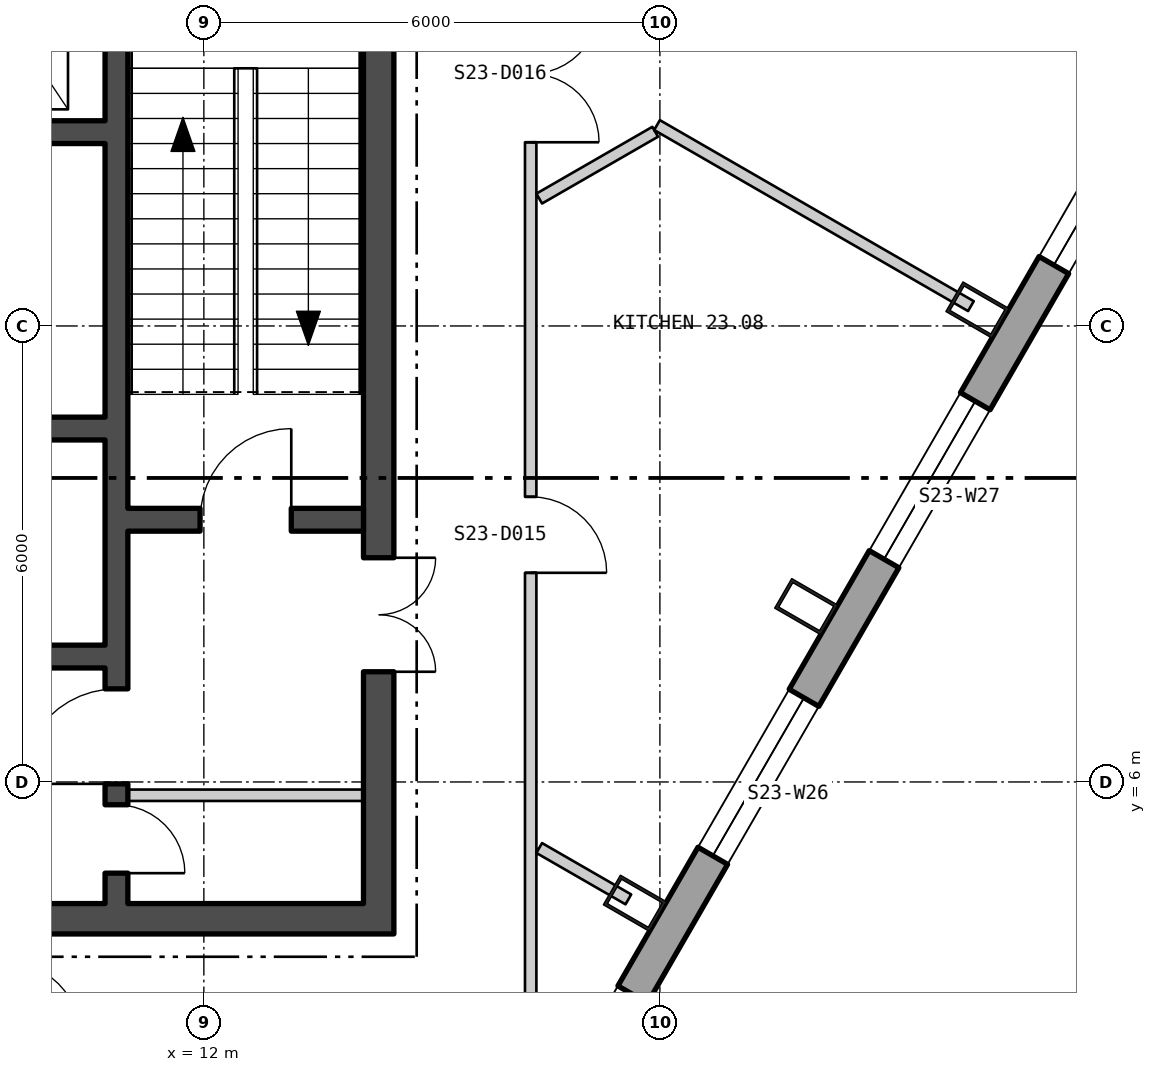
"""IFC4 building model, lengths in metres.
Left out: names, types, materials, properties, quantities, classifications, styles, units other than length and angle.
Written with IfcOpenShell. Run it as: python <this file> out.ifc"""

import sys

from ifc_helpers import new_model, si_unit, direction, frame, frame_2d, origin, origin_2d, place, context, subcontext, project, spatial, polyline, rectangle, hollow_rectangle, outline, extrude, element, fill, save


model = new_model("IFC4")
c1 = context("Model", 3, precision=1e-05, world=origin(), true_north=direction((0.0, 1.0)))
c2 = subcontext(c1, "Body", "Model", "MODEL_VIEW")
j1 = project(units=[si_unit("LENGTHUNIT", "METRE"), si_unit("PLANEANGLEUNIT", "RADIAN")], contexts=[c1])
p1 = place(None, origin())
s1 = spatial("IfcSite", under=j1, at=p1, CompositionType="ELEMENT")
p2 = place(p1, origin())
s2 = spatial("IfcBuilding", under=s1, at=p2, CompositionType="ELEMENT")
p3 = place(p2, frame((0.0, 0.0, 304.2)))
s3 = spatial("IfcBuildingStorey", under=s2, at=p3, CompositionType="ELEMENT", Elevation=304.2)
for number, where, z_axis, x_axis in (
    (1, (17.671, 4.404, 0.0), (0.0, 0.0, 1.0), (0.5, 0.866, 0.0)),
    (2, (19.925, 8.307, 0.0), (0.0, 0.0, 1.0), (0.5, 0.866, 0.0)),
    (3, (22.178, 12.21, 0.0), (0.0, 0.0, 1.0), (0.5, 0.866, 0.0)),
):
    element("IfcColumn", number, at=place(p3, frame(where, z_axis=z_axis, x_axis=x_axis)), inside=s3, PredefinedType="COLUMN", context=c2, shape_type="SweptSolid", body=[
        extrude(hollow_rectangle(XDim=0.45, YDim=0.7, WallThickness=0.04, at=origin_2d()), origin(), (0.0, 0.0, 1.0), 4.2),
    ])
p4 = place(p3, frame((2.23, -23.491, -0.18), z_axis=(0.0, 0.0, 1.0), x_axis=(0.500000141277, 0.866025322218, 0.0)))
e4 = element("IfcWall", 4, at=p4, inside=s3, PredefinedType="SOLIDWALL", context=c2, shape_type="SweptSolid", body=[
    extrude(outline(polyline([(-0.13, -0.225), (45.86, -0.225), (45.6, 0.225), (0.13, 0.225), (-0.13, -0.225)])), origin(), (0.0, 0.0, 1.0), 3.98),
])
p5 = place(p4, frame((1.424, 0.0, 1.08)))
e5 = element("IfcOpeningElement", 5, at=p5, cuts=e4, PredefinedType="OPENING", context=c2, shape_type="SweptSolid", body=[
    extrude(rectangle(XDim=2.4, YDim=2.3, at=frame_2d((1.2, 1.15))), frame((0.0, 0.235, 0.0), z_axis=(0.0, -1.0, 0.0), x_axis=(1.0, 0.0, 0.0)), (0.0, 0.0, 1.0), 0.47),
])
p6 = place(p4, frame((5.892, 0.0, 1.08)))
e6 = element("IfcOpeningElement", 6, at=p6, cuts=e4, PredefinedType="OPENING", context=c2, shape_type="SweptSolid", body=[
    extrude(rectangle(XDim=2.4, YDim=2.3, at=frame_2d((1.2, 1.15))), frame((0.0, 0.235, 0.0), z_axis=(0.0, -1.0, 0.0), x_axis=(1.0, 0.0, 0.0)), (0.0, 0.0, 1.0), 0.47),
])
p7 = place(p4, frame((10.399, 0.0, 1.08)))
e7 = element("IfcOpeningElement", 7, at=p7, cuts=e4, PredefinedType="OPENING", context=c2, shape_type="SweptSolid", body=[
    extrude(rectangle(XDim=2.4, YDim=2.3, at=frame_2d((1.2, 1.15))), frame((0.0, 0.235, 0.0), z_axis=(0.0, -1.0, 0.0), x_axis=(1.0, 0.0, 0.0)), (0.0, 0.0, 1.0), 0.47),
])
p8 = place(p4, frame((14.905, 0.0, 1.08)))
e8 = element("IfcOpeningElement", 8, at=p8, cuts=e4, PredefinedType="OPENING", context=c2, shape_type="SweptSolid", body=[
    extrude(rectangle(XDim=2.4, YDim=2.3, at=frame_2d((1.2, 1.15))), frame((0.0, 0.235, 0.0), z_axis=(0.0, -1.0, 0.0), x_axis=(1.0, 0.0, 0.0)), (0.0, 0.0, 1.0), 0.47),
])
p9 = place(p4, frame((19.412, 0.0, 1.08)))
e9 = element("IfcOpeningElement", 9, at=p9, cuts=e4, PredefinedType="OPENING", context=c2, shape_type="SweptSolid", body=[
    extrude(rectangle(XDim=2.4, YDim=2.3, at=frame_2d((1.2, 1.15))), frame((0.0, 0.235, 0.0), z_axis=(0.0, -1.0, 0.0), x_axis=(1.0, 0.0, 0.0)), (0.0, 0.0, 1.0), 0.47),
])
p10 = place(p4, frame((23.918, 0.0, 1.08)))
e10 = element("IfcOpeningElement", 10, at=p10, cuts=e4, PredefinedType="OPENING", context=c2, shape_type="SweptSolid", body=[
    extrude(rectangle(XDim=2.4, YDim=2.3, at=frame_2d((1.2, 1.15))), frame((0.0, 0.235, 0.0), z_axis=(0.0, -1.0, 0.0), x_axis=(1.0, 0.0, 0.0)), (0.0, 0.0, 1.0), 0.47),
])
p11 = place(p4, frame((28.425, 0.0, 1.08)))
e11 = element("IfcOpeningElement", 11, at=p11, cuts=e4, PredefinedType="OPENING", context=c2, shape_type="SweptSolid", body=[
    extrude(rectangle(XDim=2.4, YDim=2.3, at=frame_2d((1.2, 1.15))), frame((0.0, 0.235, 0.0), z_axis=(0.0, -1.0, 0.0), x_axis=(1.0, 0.0, 0.0)), (0.0, 0.0, 1.0), 0.47),
])
p12 = place(p4, frame((32.932, 0.0, 1.08)))
e12 = element("IfcOpeningElement", 12, at=p12, cuts=e4, PredefinedType="OPENING", context=c2, shape_type="SweptSolid", body=[
    extrude(rectangle(XDim=2.4, YDim=2.3, at=frame_2d((1.2, 1.15))), frame((0.0, 0.235, 0.0), z_axis=(0.0, -1.0, 0.0), x_axis=(1.0, 0.0, 0.0)), (0.0, 0.0, 1.0), 0.47),
])
p13 = place(p4, frame((37.438, 0.0, 1.08)))
e13 = element("IfcOpeningElement", 13, at=p13, cuts=e4, PredefinedType="OPENING", context=c2, shape_type="SweptSolid", body=[
    extrude(rectangle(XDim=2.4, YDim=2.3, at=frame_2d((1.2, 1.15))), frame((0.0, 0.235, 0.0), z_axis=(0.0, -1.0, 0.0), x_axis=(1.0, 0.0, 0.0)), (0.0, 0.0, 1.0), 0.47),
])
p14 = place(p4, frame((41.907, 0.0, 1.08)))
e14 = element("IfcOpeningElement", 14, at=p14, cuts=e4, PredefinedType="OPENING", context=c2, shape_type="SweptSolid", body=[
    extrude(rectangle(XDim=2.4, YDim=2.3, at=frame_2d((1.2, 1.15))), frame((0.0, 0.235, 0.0), z_axis=(0.0, -1.0, 0.0), x_axis=(1.0, 0.0, 0.0)), (0.0, 0.0, 1.0), 0.47),
])
p15 = place(p3, frame((-14.5, 4.2, 0.0), z_axis=(0.0, 0.0, 1.0), x_axis=(1.0, 0.0, 0.0)))
e15 = element("IfcWall", 15, at=p15, inside=s3, PredefinedType="SHEAR", context=c2, shape_type="SweptSolid", body=[
    extrude(rectangle(XDim=29.0, YDim=0.4, at=frame_2d((14.5, 0.0))), origin(), (0.0, 0.0, 1.0), 4.0),
])
p16 = place(p15, frame((9.0, 0.0, 0.0)))
e16 = element("IfcOpeningElement", 16, at=p16, cuts=e15, PredefinedType="OPENING", context=c2, shape_type="SweptSolid", body=[
    extrude(rectangle(XDim=1.8, YDim=2.4, at=frame_2d((0.9, 1.2))), frame((0.0, 0.21, 0.0), z_axis=(0.0, -1.0, 0.0), x_axis=(1.0, 0.0, 0.0)), (0.0, 0.0, 1.0), 0.42),
])
p17 = place(p15, frame((19.0, 0.0, 0.0)))
e17 = element("IfcOpeningElement", 17, at=p17, cuts=e15, PredefinedType="OPENING", context=c2, shape_type="SweptSolid", body=[
    extrude(rectangle(XDim=1.8, YDim=2.4, at=frame_2d((0.9, 1.2))), frame((0.0, 0.21, 0.0), z_axis=(0.0, -1.0, 0.0), x_axis=(1.0, 0.0, 0.0)), (0.0, 0.0, 1.0), 0.42),
])
p18 = place(p3, frame((14.3, 4.4, 0.0), z_axis=(0.0, 0.0, 1.0), x_axis=(0.0, 1.0, 0.0)))
e18 = element("IfcWall", 18, at=p18, inside=s3, PredefinedType="SHEAR", context=c2, shape_type="SweptSolid", body=[
    extrude(rectangle(XDim=13.2, YDim=0.4, at=frame_2d((6.6, 0.0))), origin(), (0.0, 0.0, 1.0), 4.0),
])
p19 = place(p18, frame((3.05, 0.0, 0.0)))
e19 = element("IfcOpeningElement", 19, at=p19, cuts=e18, PredefinedType="OPENING", context=c2, shape_type="SweptSolid", body=[
    extrude(rectangle(XDim=1.5, YDim=2.1, at=frame_2d((0.75, 1.05))), frame((0.0, 0.21, 0.0), z_axis=(0.0, -1.0, 0.0), x_axis=(1.0, 0.0, 0.0)), (0.0, 0.0, 1.0), 0.42),
])
p20 = place(p3, frame((10.85, 4.4, 0.0), z_axis=(0.0, 0.0, 1.0), x_axis=(0.0, 1.0, 0.0)))
e20 = element("IfcWall", 20, at=p20, inside=s3, PredefinedType="SHEAR", context=c2, shape_type="SweptSolid", body=[
    extrude(rectangle(XDim=13.2, YDim=0.3, at=frame_2d((6.6, 0.0))), origin(), (0.0, 0.0, 1.0), 4.0),
])
p21 = place(p20, frame((1.575, 0.0, 0.0)))
e21 = element("IfcOpeningElement", 21, at=p21, cuts=e20, PredefinedType="OPENING", context=c2, shape_type="SweptSolid", body=[
    extrude(rectangle(XDim=1.25, YDim=2.1, at=frame_2d((0.625, 1.05))), frame((0.0, 0.16, 0.0), z_axis=(0.0, -1.0, 0.0), x_axis=(1.0, 0.0, 0.0)), (0.0, 0.0, 1.0), 0.32),
])
p22 = place(p20, frame((0.4, 0.0, 0.0)))
e22 = element("IfcOpeningElement", 22, at=p22, cuts=e20, PredefinedType="OPENING", context=c2, shape_type="SweptSolid", body=[
    extrude(rectangle(XDim=0.9, YDim=2.1, at=frame_2d((0.45, 1.05))), frame((0.0, 0.16, 0.0), z_axis=(0.0, -1.0, 0.0), x_axis=(1.0, 0.0, 0.0)), (0.0, 0.0, 1.0), 0.32),
])
p23 = place(p3, frame((11.0, 9.45, 0.0), z_axis=(0.0, 0.0, 1.0), x_axis=(1.0, 0.0, 0.0)))
e23 = element("IfcWall", 23, at=p23, inside=s3, PredefinedType="SHEAR", context=c2, shape_type="SweptSolid", body=[
    extrude(rectangle(XDim=3.1, YDim=0.3, at=frame_2d((1.55, 0.0))), origin(), (0.0, 0.0, 1.0), 4.0),
])
p24 = place(p23, frame((0.95, 0.0, 0.0)))
e24 = element("IfcOpeningElement", 24, at=p24, cuts=e23, PredefinedType="OPENING", context=c2, shape_type="SweptSolid", body=[
    extrude(rectangle(XDim=1.2, YDim=2.1, at=frame_2d((0.6, 1.05))), frame((0.0, 0.16, 0.0), z_axis=(0.0, -1.0, 0.0), x_axis=(1.0, 0.0, 0.0)), (0.0, 0.0, 1.0), 0.32),
])
p25 = place(p3, frame((-10.7, 14.55, 0.0), z_axis=(0.0, 0.0, 1.0), x_axis=(1.0, 0.0, 0.0)))
e25 = element("IfcWall", 25, at=p25, inside=s3, PredefinedType="SHEAR", context=c2, shape_type="SweptSolid", body=[
    extrude(rectangle(XDim=21.4, YDim=0.3, at=frame_2d((10.7, 0.0))), origin(), (0.0, 0.0, 1.0), 4.0),
])
p26 = place(p25, frame((0.738, 0.0, 0.0)))
e26 = element("IfcOpeningElement", 26, at=p26, cuts=e25, PredefinedType="OPENING", context=c2, shape_type="SweptSolid", body=[
    extrude(rectangle(XDim=1.1, YDim=2.1, at=frame_2d((0.55, 1.05))), frame((0.0, 0.16, 0.0), z_axis=(0.0, -1.0, 0.0), x_axis=(1.0, 0.0, 0.0)), (0.0, 0.0, 1.0), 0.32),
])
p27 = place(p25, frame((3.462, 0.0, 0.0)))
e27 = element("IfcOpeningElement", 27, at=p27, cuts=e25, PredefinedType="OPENING", context=c2, shape_type="SweptSolid", body=[
    extrude(rectangle(XDim=1.1, YDim=2.1, at=frame_2d((0.55, 1.05))), frame((0.0, 0.16, 0.0), z_axis=(0.0, -1.0, 0.0), x_axis=(1.0, 0.0, 0.0)), (0.0, 0.0, 1.0), 0.32),
])
p28 = place(p25, frame((6.138, 0.0, 0.0)))
e28 = element("IfcOpeningElement", 28, at=p28, cuts=e25, PredefinedType="OPENING", context=c2, shape_type="SweptSolid", body=[
    extrude(rectangle(XDim=1.1, YDim=2.1, at=frame_2d((0.55, 1.05))), frame((0.0, 0.16, 0.0), z_axis=(0.0, -1.0, 0.0), x_axis=(1.0, 0.0, 0.0)), (0.0, 0.0, 1.0), 0.32),
])
p29 = place(p25, frame((8.812, 0.0, 0.0)))
e29 = element("IfcOpeningElement", 29, at=p29, cuts=e25, PredefinedType="OPENING", context=c2, shape_type="SweptSolid", body=[
    extrude(rectangle(XDim=1.1, YDim=2.1, at=frame_2d((0.55, 1.05))), frame((0.0, 0.16, 0.0), z_axis=(0.0, -1.0, 0.0), x_axis=(1.0, 0.0, 0.0)), (0.0, 0.0, 1.0), 0.32),
])
p30 = place(p25, frame((19.562, 0.0, 0.0)))
e30 = element("IfcOpeningElement", 30, at=p30, cuts=e25, PredefinedType="OPENING", context=c2, shape_type="SweptSolid", body=[
    extrude(rectangle(XDim=1.1, YDim=2.1, at=frame_2d((0.55, 1.05))), frame((0.0, 0.16, 0.0), z_axis=(0.0, -1.0, 0.0), x_axis=(1.0, 0.0, 0.0)), (0.0, 0.0, 1.0), 0.32),
])
p31 = place(p25, frame((11.537, 0.0, 0.0)))
e31 = element("IfcOpeningElement", 31, at=p31, cuts=e25, PredefinedType="OPENING", context=c2, shape_type="SweptSolid", body=[
    extrude(rectangle(XDim=1.0, YDim=2.1, at=frame_2d((0.5, 1.05))), frame((0.0, 0.16, 0.0), z_axis=(0.0, -1.0, 0.0), x_axis=(1.0, 0.0, 0.0)), (0.0, 0.0, 1.0), 0.32),
])
p32 = place(p25, frame((14.213, 0.0, 0.0)))
e32 = element("IfcOpeningElement", 32, at=p32, cuts=e25, PredefinedType="OPENING", context=c2, shape_type="SweptSolid", body=[
    extrude(rectangle(XDim=1.0, YDim=2.1, at=frame_2d((0.5, 1.05))), frame((0.0, 0.16, 0.0), z_axis=(0.0, -1.0, 0.0), x_axis=(1.0, 0.0, 0.0)), (0.0, 0.0, 1.0), 0.32),
])
p33 = place(p25, frame((16.887, 0.0, 0.0)))
e33 = element("IfcOpeningElement", 33, at=p33, cuts=e25, PredefinedType="OPENING", context=c2, shape_type="SweptSolid", body=[
    extrude(rectangle(XDim=1.0, YDim=2.1, at=frame_2d((0.5, 1.05))), frame((0.0, 0.16, 0.0), z_axis=(0.0, -1.0, 0.0), x_axis=(1.0, 0.0, 0.0)), (0.0, 0.0, 1.0), 0.32),
])
p34 = place(p3, frame((2.6, 10.65, 0.0), z_axis=(0.0, 0.0, 1.0), x_axis=(1.0, 0.0, 0.0)))
e34 = element("IfcWall", 34, at=p34, inside=s3, PredefinedType="SHEAR", context=c2, shape_type="SweptSolid", body=[
    extrude(rectangle(XDim=8.1, YDim=0.3, at=frame_2d((4.05, 0.0))), origin(), (0.0, 0.0, 1.0), 4.0),
])
p35 = place(p34, frame((0.933, 0.0, 0.0)))
e35 = element("IfcOpeningElement", 35, at=p35, cuts=e34, PredefinedType="OPENING", context=c2, shape_type="SweptSolid", body=[
    extrude(rectangle(XDim=1.0, YDim=2.1, at=frame_2d((0.5, 1.05))), frame((0.0, 0.16, 0.0), z_axis=(0.0, -1.0, 0.0), x_axis=(1.0, 0.0, 0.0)), (0.0, 0.0, 1.0), 0.32),
])
p36 = place(p34, frame((3.6, 0.0, 0.0)))
e36 = element("IfcOpeningElement", 36, at=p36, cuts=e34, PredefinedType="OPENING", context=c2, shape_type="SweptSolid", body=[
    extrude(rectangle(XDim=1.0, YDim=2.1, at=frame_2d((0.5, 1.05))), frame((0.0, 0.16, 0.0), z_axis=(0.0, -1.0, 0.0), x_axis=(1.0, 0.0, 0.0)), (0.0, 0.0, 1.0), 0.32),
])
p37 = place(p34, frame((6.317, 0.0, 0.0)))
e37 = element("IfcOpeningElement", 37, at=p37, cuts=e34, PredefinedType="OPENING", context=c2, shape_type="SweptSolid", body=[
    extrude(rectangle(XDim=1.0, YDim=2.1, at=frame_2d((0.5, 1.05))), frame((0.0, 0.16, 0.0), z_axis=(0.0, -1.0, 0.0), x_axis=(1.0, 0.0, 0.0)), (0.0, 0.0, 1.0), 0.32),
])
p38 = place(p3, frame((2.6, 7.65, 0.0), z_axis=(0.0, 0.0, 1.0), x_axis=(1.0, 0.0, 0.0)))
e38 = element("IfcWall", 38, at=p38, inside=s3, PredefinedType="SHEAR", context=c2, shape_type="SweptSolid", body=[
    extrude(rectangle(XDim=8.1, YDim=0.3, at=frame_2d((4.05, 0.0))), origin(), (0.0, 0.0, 1.0), 4.0),
])
p39 = place(p3, frame((11.0, 5.825, 0.0), z_axis=(0.0, 0.0, 1.0), x_axis=(1.0, 0.0, 0.0)))
e39 = element("IfcWall", 39, at=p39, inside=s3, PredefinedType="PARTITIONING", context=c2, shape_type="SweptSolid", body=[
    extrude(rectangle(XDim=3.1, YDim=0.15, at=frame_2d((1.55, 0.0))), origin(), (0.0, 0.0, 1.0), 4.0),
])
p40 = place(p3, frame((16.3, 2.125, 0.0), z_axis=(0.0, 0.0, 1.0), x_axis=(0.0, 1.0, 0.0)))
e40 = element("IfcWall", 40, at=p40, inside=s3, PredefinedType="PARTITIONING", context=c2, shape_type="SweptSolid", body=[
    extrude(rectangle(XDim=17.623, YDim=0.15, at=frame_2d((8.812, 0.0))), origin(), (0.0, 0.0, 1.0), 4.0),
])
p41 = place(p40, frame((6.627, 0.0, 0.0)))
e41 = element("IfcOpeningElement", 41, at=p41, cuts=e40, PredefinedType="OPENING", context=c2, shape_type="SweptSolid", body=[
    extrude(rectangle(XDim=1.0, YDim=2.1, at=frame_2d((0.5, 1.05))), frame((0.0, 0.085, 0.0), z_axis=(0.0, -1.0, 0.0), x_axis=(1.0, 0.0, 0.0)), (0.0, 0.0, 1.0), 0.17),
])
p42 = place(p40, frame((12.292, 0.0, 0.0)))
e42 = element("IfcOpeningElement", 42, at=p42, cuts=e40, PredefinedType="OPENING", context=c2, shape_type="SweptSolid", body=[
    extrude(rectangle(XDim=1.8, YDim=2.1, at=frame_2d((0.9, 1.05))), frame((0.0, 0.085, 0.0), z_axis=(0.0, -1.0, 0.0), x_axis=(1.0, 0.0, 0.0)), (0.0, 0.0, 1.0), 0.17),
])
p43 = place(p3, frame((16.412, 13.676, 0.0), z_axis=(0.0, 0.0, 1.0), x_axis=(0.866525711774, 0.499132438171, 0.0)))
e43 = element("IfcWall", 43, at=p43, inside=s3, PredefinedType="PARTITIONING", context=c2, shape_type="SweptSolid", body=[
    extrude(rectangle(XDim=1.761, YDim=0.15, at=frame_2d((0.881, 0.0))), origin(), (0.0, 0.0, 1.0), 4.0),
])
p44 = place(p3, frame((16.412, 5.131, 0.0), z_axis=(0.0, 0.0, 1.0), x_axis=(0.866419132933, -0.499317420173, 0.0)))
e44 = element("IfcWall", 44, at=p44, inside=s3, PredefinedType="PARTITIONING", context=c2, shape_type="SweptSolid", body=[
    extrude(rectangle(XDim=1.354, YDim=0.15, at=frame_2d((0.677, 0.0))), origin(), (0.0, 0.0, 1.0), 4.0),
])
p45 = place(p3, frame((17.962, 14.643, 0.0), z_axis=(0.0, 0.0, 1.0), x_axis=(0.866248432975, -0.499613502989, 0.0)))
e45 = element("IfcWall", 45, at=p45, inside=s3, PredefinedType="PARTITIONING", context=c2, shape_type="SweptSolid", body=[
    extrude(rectangle(XDim=4.768, YDim=0.15, at=frame_2d((2.384, 0.0))), origin(), (0.0, 0.0, 1.0), 4.0),
])
p46 = place(p11, origin())
e46 = element("IfcWindow", 46, at=p46, inside=s3, PartitioningType="SINGLE_PANEL", PredefinedType="WINDOW", context=c2, shape_type="SweptSolid", body=[
    extrude(rectangle(XDim=2.4, YDim=2.3, at=frame_2d((1.2, 1.15))), frame((0.0, 0.105, 0.0), z_axis=(0.0, -1.0, 0.0), x_axis=(1.0, 0.0, 0.0)), (0.0, 0.0, 1.0), 0.06),
])
fill(e11, e46)
p47 = place(p12, origin())
e47 = element("IfcWindow", 47, at=p47, inside=s3, PartitioningType="SINGLE_PANEL", PredefinedType="WINDOW", context=c2, shape_type="SweptSolid", body=[
    extrude(rectangle(XDim=2.4, YDim=2.3, at=frame_2d((1.2, 1.15))), frame((0.0, 0.105, 0.0), z_axis=(0.0, -1.0, 0.0), x_axis=(1.0, 0.0, 0.0)), (0.0, 0.0, 1.0), 0.06),
])
fill(e12, e47)
p48 = place(p13, origin())
e48 = element("IfcWindow", 48, at=p48, inside=s3, PartitioningType="SINGLE_PANEL", PredefinedType="WINDOW", context=c2, shape_type="SweptSolid", body=[
    extrude(rectangle(XDim=2.4, YDim=2.3, at=frame_2d((1.2, 1.15))), frame((0.0, 0.105, 0.0), z_axis=(0.0, -1.0, 0.0), x_axis=(1.0, 0.0, 0.0)), (0.0, 0.0, 1.0), 0.06),
])
fill(e13, e48)
p49 = place(p14, origin())
e49 = element("IfcWindow", 49, at=p49, inside=s3, PartitioningType="SINGLE_PANEL", PredefinedType="WINDOW", context=c2, shape_type="SweptSolid", body=[
    extrude(rectangle(XDim=2.4, YDim=2.3, at=frame_2d((1.2, 1.15))), frame((0.0, 0.105, 0.0), z_axis=(0.0, -1.0, 0.0), x_axis=(1.0, 0.0, 0.0)), (0.0, 0.0, 1.0), 0.06),
])
fill(e14, e49)
p50 = place(p24, origin())
e50 = element("IfcDoor", 50, at=p50, inside=s3, OperationType="SINGLE_SWING_LEFT", PredefinedType="DOOR", context=c2, shape_type="SweptSolid", body=[
    extrude(rectangle(XDim=1.2, YDim=2.1, at=frame_2d((0.6, 1.05))), frame((0.0, 0.025, 0.0), z_axis=(0.0, -1.0, 0.0), x_axis=(1.0, 0.0, 0.0)), (0.0, 0.0, 1.0), 0.05),
])
fill(e24, e50)
p51 = place(p21, origin())
e51 = element("IfcDoor", 51, at=p51, inside=s3, OperationType="SINGLE_SWING_RIGHT", PredefinedType="DOOR", context=c2, shape_type="SweptSolid", body=[
    extrude(rectangle(XDim=1.25, YDim=2.1, at=frame_2d((0.625, 1.05))), frame((0.0, 0.025, 0.0), z_axis=(0.0, -1.0, 0.0), x_axis=(1.0, 0.0, 0.0)), (0.0, 0.0, 1.0), 0.05),
])
fill(e21, e51)
p52 = place(p19, origin())
e52 = element("IfcDoor", 52, at=p52, inside=s3, OperationType="DOUBLE_DOOR_SINGLE_SWING", PredefinedType="DOOR", context=c2, shape_type="SweptSolid", body=[
    extrude(rectangle(XDim=1.5, YDim=2.1, at=frame_2d((0.75, 1.05))), frame((0.0, 0.025, 0.0), z_axis=(0.0, -1.0, 0.0), x_axis=(1.0, 0.0, 0.0)), (0.0, 0.0, 1.0), 0.05),
])
fill(e19, e52)
p53 = place(p22, origin())
e53 = element("IfcDoor", 53, at=p53, inside=s3, OperationType="SINGLE_SWING_LEFT", PredefinedType="DOOR", context=c2, shape_type="SweptSolid", body=[
    extrude(rectangle(XDim=0.9, YDim=2.1, at=frame_2d((0.45, 1.05))), frame((0.0, 0.025, 0.0), z_axis=(0.0, -1.0, 0.0), x_axis=(1.0, 0.0, 0.0)), (0.0, 0.0, 1.0), 0.05),
])
fill(e22, e53)
p54 = place(p41, origin())
e54 = element("IfcDoor", 54, at=p54, inside=s3, OperationType="SINGLE_SWING_LEFT", PredefinedType="DOOR", context=c2, shape_type="SweptSolid", body=[
    extrude(rectangle(XDim=1.0, YDim=2.1, at=frame_2d((0.5, 1.05))), frame((0.0, 0.025, 0.0), z_axis=(0.0, -1.0, 0.0), x_axis=(1.0, 0.0, 0.0)), (0.0, 0.0, 1.0), 0.05),
])
fill(e41, e54)
p55 = place(p42, origin())
e55 = element("IfcDoor", 55, at=p55, inside=s3, OperationType="DOUBLE_DOOR_SINGLE_SWING", PredefinedType="DOOR", context=c2, shape_type="SweptSolid", body=[
    extrude(rectangle(XDim=1.8, YDim=2.1, at=frame_2d((0.9, 1.05))), frame((0.0, 0.025, 0.0), z_axis=(0.0, -1.0, 0.0), x_axis=(1.0, 0.0, 0.0)), (0.0, 0.0, 1.0), 0.05),
])
fill(e42, e55)
save(model, sys.argv[1])
